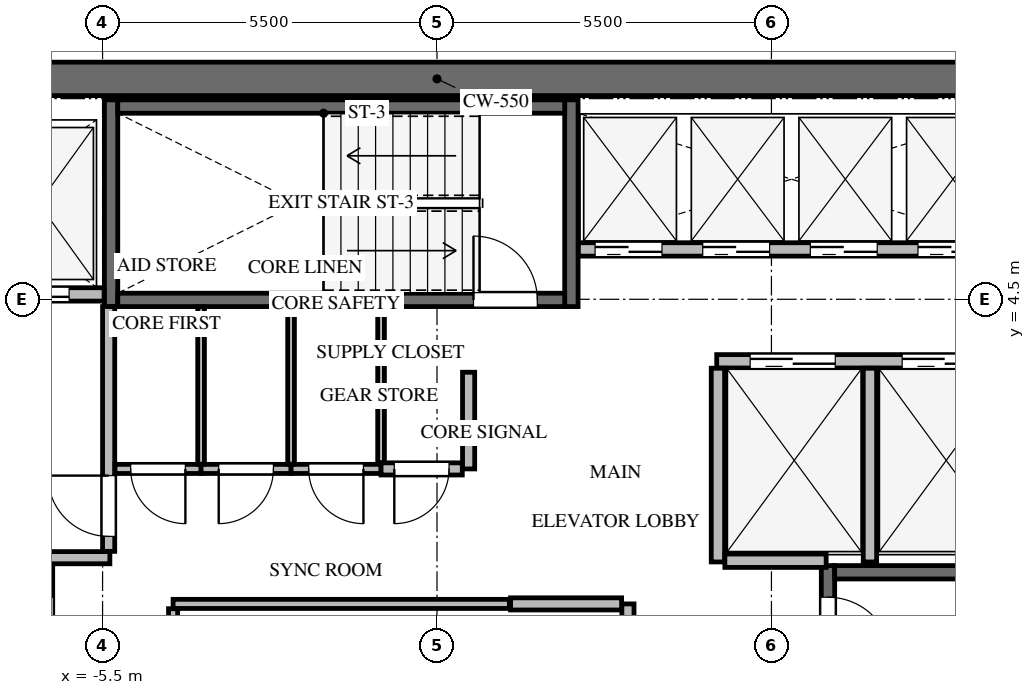
"""IFC4 building model, lengths in metres.
Left out: names, types, materials, properties, quantities, classifications, styles, units other than length and angle.
Written with IfcOpenShell. Run it as: python <this file> out.ifc"""

import sys

from ifc_helpers import new_model, si_unit, direction, frame, frame_2d, origin, place, context, subcontext, project, spatial, rectangle, extrude, source, transform, mapped, element, fill, save


model = new_model("IFC4")
c1 = context("Model", 3, precision=1e-05, world=origin(), true_north=direction((0.0, 1.0)))
c2 = subcontext(c1, "Body", "Model", "MODEL_VIEW")
j1 = project(units=[si_unit("LENGTHUNIT", "METRE"), si_unit("PLANEANGLEUNIT", "RADIAN")], contexts=[c1])
p1 = place(None, origin())
s1 = spatial("IfcSite", under=j1, at=p1, CompositionType="ELEMENT")
p2 = place(p1, origin())
s2 = spatial("IfcBuilding", under=s1, at=p2, CompositionType="ELEMENT")
p3 = place(p2, frame((0.0, 0.0, 248.0)))
s3 = spatial("IfcBuildingStorey", under=s2, at=p3, CompositionType="ELEMENT", Elevation=248.0)
p4 = place(p3, frame((-9.85, 8.125, 0.0), z_axis=(0.0, 0.0, 1.0), x_axis=(1.0, 0.0, 0.0)))
e1 = element("IfcWall", 1, at=p4, inside=s3, PredefinedType="SHEAR", context=c2, shape_type="SweptSolid", body=[
    extrude(rectangle(XDim=19.7, YDim=0.55, at=frame_2d((9.85, 0.0))), origin(), (0.0, 0.0, 1.0), 3.3),
])
p5 = place(p3, frame((-6.43, -7.77, -0.24), z_axis=(0.0, 0.0, 1.0), x_axis=(0.0, 1.0, 0.0)))
e2 = element("IfcWall", 2, at=p5, inside=s3, PredefinedType="SHEAR", context=c2, shape_type="SweptSolid", body=[
    extrude(rectangle(XDim=7.89, YDim=0.22, at=frame_2d((3.945, 0.0))), origin(), (0.0, 0.0, 1.0), 3.3),
])
p6 = place(p5, frame((6.32, 0.0, 0.0)))
e3 = element("IfcOpeningElement", 3, at=p6, cuts=e2, PredefinedType="OPENING", context=c2, shape_type="SweptSolid", body=[
    extrude(rectangle(XDim=1.05, YDim=2.15, at=frame_2d((0.525, 1.075))), frame((0.0, 0.12, 0.0), z_axis=(0.0, -1.0, 0.0), x_axis=(1.0, 0.0, 0.0)), (0.0, 0.0, 1.0), 0.24),
])
p7 = place(p3, frame((6.43, 0.12, -0.24), z_axis=(0.0, 0.0, 1.0), x_axis=(0.0, -1.0, 0.0)))
e4 = element("IfcWall", 4, at=p7, inside=s3, PredefinedType="SHEAR", context=c2, shape_type="SweptSolid", body=[
    extrude(rectangle(XDim=7.89, YDim=0.22, at=frame_2d((3.945, 0.0))), origin(), (0.0, 0.0, 1.0), 3.3),
])
p8 = place(p7, frame((0.52, 0.0, 0.0)))
e5 = element("IfcOpeningElement", 5, at=p8, cuts=e4, PredefinedType="OPENING", context=c2, shape_type="SweptSolid", body=[
    extrude(rectangle(XDim=1.05, YDim=2.15, at=frame_2d((0.525, 1.075))), frame((0.0, 0.12, 0.0), z_axis=(0.0, -1.0, 0.0), x_axis=(1.0, 0.0, 0.0)), (0.0, 0.0, 1.0), 0.24),
])
p9 = place(p3, frame((9.5, 0.01, -0.24), z_axis=(0.0, 0.0, 1.0), x_axis=(-1.0, 0.0, 0.0)))
e6 = element("IfcWall", 6, at=p9, inside=s3, PredefinedType="SHEAR", context=c2, shape_type="SweptSolid", body=[
    extrude(rectangle(XDim=2.96, YDim=0.22, at=frame_2d((1.48, 0.0))), origin(), (0.0, 0.0, 1.0), 3.3),
])
for number, where, z_axis, x_axis in (
    (7, (2.21, 4.38, -0.24), (0.0, 0.0, 1.0), (0.0, 1.0, 0.0)),
    (8, (-5.36, 7.78, -0.24), (0.0, 0.0, 1.0), (0.0, -1.0, 0.0)),
):
    element("IfcWall", number, at=place(p3, frame(where, z_axis=z_axis, x_axis=x_axis)), inside=s3, PredefinedType="SHEAR", context=c2, shape_type="SweptSolid", body=[
        extrude(rectangle(XDim=3.4, YDim=0.22, at=frame_2d((1.7, 0.0))), origin(), (0.0, 0.0, 1.0), 3.3),
    ])
p10 = place(p3, frame((-5.25, 4.49, -0.24), z_axis=(0.0, 0.0, 1.0), x_axis=(1.0, 0.0, 0.0)))
e9 = element("IfcWall", 9, at=p10, inside=s3, PredefinedType="SHEAR", context=c2, shape_type="SweptSolid", body=[
    extrude(rectangle(XDim=7.35, YDim=0.22, at=frame_2d((3.675, 0.0))), origin(), (0.0, 0.0, 1.0), 3.3),
])
p11 = place(p10, frame((5.85, 0.0, 0.0)))
e10 = element("IfcOpeningElement", 10, at=p11, cuts=e9, PredefinedType="OPENING", context=c2, shape_type="SweptSolid", body=[
    extrude(rectangle(XDim=1.05, YDim=2.15, at=frame_2d((0.525, 1.075))), frame((0.0, 0.12, 0.0), z_axis=(0.0, -1.0, 0.0), x_axis=(1.0, 0.0, 0.0)), (0.0, 0.0, 1.0), 0.24),
])
p12 = place(p3, frame((2.1, 7.67, -0.24), z_axis=(0.0, 0.0, 1.0), x_axis=(-1.0, 0.0, 0.0)))
e11 = element("IfcWall", 11, at=p12, inside=s3, PredefinedType="SHEAR", context=c2, shape_type="SweptSolid", body=[
    extrude(rectangle(XDim=7.35, YDim=0.22, at=frame_2d((3.675, 0.0))), origin(), (0.0, 0.0, 1.0), 3.3),
])
p13 = place(p3, frame((-9.65, 4.58, 0.0), z_axis=(0.0, 0.0, 1.0), x_axis=(1.0, 0.0, 0.0)))
e12 = element("IfcWall", 12, at=p13, inside=s3, PredefinedType="SOLIDWALL", context=c2, shape_type="SweptSolid", body=[
    extrude(rectangle(XDim=4.175, YDim=0.22, at=frame_2d((2.087, 0.0))), origin(), (0.0, 0.0, 1.0), 3.045),
])
p14 = place(p13, frame((0.4, 0.0, 0.0)))
e13 = element("IfcOpeningElement", 13, at=p14, cuts=e12, PredefinedType="OPENING", context=c2, shape_type="SweptSolid", body=[
    extrude(rectangle(XDim=1.2, YDim=2.15, at=frame_2d((0.6, 1.075))), frame((0.0, 0.12, 0.0), z_axis=(0.0, -1.0, 0.0), x_axis=(1.0, 0.0, 0.0)), (0.0, 0.0, 1.0), 0.24),
])
p15 = place(p13, frame((2.4, 0.0, 0.0)))
e14 = element("IfcOpeningElement", 14, at=p15, cuts=e12, PredefinedType="OPENING", context=c2, shape_type="SweptSolid", body=[
    extrude(rectangle(XDim=1.2, YDim=2.15, at=frame_2d((0.6, 1.075))), frame((0.0, 0.12, 0.0), z_axis=(0.0, -1.0, 0.0), x_axis=(1.0, 0.0, 0.0)), (0.0, 0.0, 1.0), 0.24),
])
p16 = place(p3, frame((-9.65, 0.25, 0.0), z_axis=(0.0, 0.0, 1.0), x_axis=(1.0, 0.0, 0.0)))
e15 = element("IfcWall", 15, at=p16, inside=s3, PredefinedType="SOLIDWALL", context=c2, shape_type="SweptSolid", body=[
    extrude(rectangle(XDim=4.27, YDim=0.2, at=frame_2d((2.135, 0.0))), origin(), (0.0, 0.0, 1.0), 3.045),
])
p17 = place(p3, frame((-5.4, 0.354, 0.0), z_axis=(0.0, 0.0, 1.0), x_axis=(0.0, 1.0, 0.0)))
e16 = element("IfcWall", 16, at=p17, inside=s3, PredefinedType="SOLIDWALL", context=c2, shape_type="SweptSolid", body=[
    extrude(rectangle(XDim=4.026, YDim=0.2, at=frame_2d((2.013, 0.0))), origin(), (0.0, 0.0, 1.0), 3.045),
])
p18 = place(p17, frame((0.246, 0.0, 0.0)))
e17 = element("IfcOpeningElement", 17, at=p18, cuts=e16, PredefinedType="OPENING", context=c2, shape_type="SweptSolid", body=[
    extrude(rectangle(XDim=1.0, YDim=2.15, at=frame_2d((0.5, 1.075))), frame((0.0, 0.11, 0.0), z_axis=(0.0, -1.0, 0.0), x_axis=(1.0, 0.0, 0.0)), (0.0, 0.0, 1.0), 0.22),
])
p19 = place(p3, frame((4.6, 3.48, 0.0), z_axis=(0.0, 0.0, 1.0), x_axis=(1.0, 0.0, 0.0)))
e18 = element("IfcWall", 18, at=p19, inside=s3, PredefinedType="SOLIDWALL", context=c2, shape_type="SweptSolid", body=[
    extrude(rectangle(XDim=5.05, YDim=0.22, at=frame_2d((2.525, 0.0))), origin(), (0.0, 0.0, 1.0), 3.045),
])
p20 = place(p19, frame((0.55, 0.0, 0.0)))
e19 = element("IfcOpeningElement", 19, at=p20, cuts=e18, PredefinedType="OPENING", context=c2, shape_type="SweptSolid", body=[
    extrude(rectangle(XDim=1.4, YDim=2.15, at=frame_2d((0.7, 1.075))), frame((0.0, 0.12, 0.0), z_axis=(0.0, -1.0, 0.0), x_axis=(1.0, 0.0, 0.0)), (0.0, 0.0, 1.0), 0.24),
])
p21 = place(p19, frame((3.05, 0.0, 0.0)))
e20 = element("IfcOpeningElement", 20, at=p21, cuts=e18, PredefinedType="OPENING", context=c2, shape_type="SweptSolid", body=[
    extrude(rectangle(XDim=1.4, YDim=2.15, at=frame_2d((0.7, 1.075))), frame((0.0, 0.12, 0.0), z_axis=(0.0, -1.0, 0.0), x_axis=(1.0, 0.0, 0.0)), (0.0, 0.0, 1.0), 0.24),
])
for number, where, z_axis, x_axis in (
    (21, (4.62, 0.18, 0.0), (0.0, 0.0, 1.0), (0.0, 1.0, 0.0)),
    (22, (7.12, 0.18, 0.0), (0.0, 0.0, 1.0), (0.0, 1.0, 0.0)),
):
    element("IfcWall", number, at=place(p3, frame(where, z_axis=z_axis, x_axis=x_axis)), inside=s3, PredefinedType="SOLIDWALL", context=c2, shape_type="SweptSolid", body=[
        extrude(rectangle(XDim=3.186, YDim=0.22, at=frame_2d((1.593, 0.0))), origin(), (0.0, 0.0, 1.0), 3.045),
    ])
p22 = place(p3, frame((4.734, 0.2, 0.0), z_axis=(0.0, 0.0, 1.0), x_axis=(1.0, 0.0, 0.0)))
e23 = element("IfcWall", 23, at=p22, inside=s3, PredefinedType="SOLIDWALL", context=c2, shape_type="SweptSolid", body=[
    extrude(rectangle(XDim=1.666, YDim=0.22, at=frame_2d((0.833, 0.0))), origin(), (0.0, 0.0, 1.0), 3.045),
])
p23 = place(p3, frame((2.325, 5.32, 0.0), z_axis=(0.0, 0.0, 1.0), x_axis=(1.0, 0.0, 0.0)))
e24 = element("IfcWall", 24, at=p23, inside=s3, PredefinedType="SOLIDWALL", context=c2, shape_type="SweptSolid", body=[
    extrude(rectangle(XDim=7.325, YDim=0.22, at=frame_2d((3.663, 0.0))), origin(), (0.0, 0.0, 1.0), 3.045),
])
p24 = place(p23, frame((0.275, 0.0, 0.0)))
e25 = element("IfcOpeningElement", 25, at=p24, cuts=e24, PredefinedType="OPENING", context=c2, shape_type="SweptSolid", body=[
    extrude(rectangle(XDim=1.1, YDim=2.15, at=frame_2d((0.55, 1.075))), frame((0.0, 0.12, 0.0), z_axis=(0.0, -1.0, 0.0), x_axis=(1.0, 0.0, 0.0)), (0.0, 0.0, 1.0), 0.24),
])
p25 = place(p23, frame((2.045, 0.0, 0.0)))
e26 = element("IfcOpeningElement", 26, at=p25, cuts=e24, PredefinedType="OPENING", context=c2, shape_type="SweptSolid", body=[
    extrude(rectangle(XDim=1.1, YDim=2.15, at=frame_2d((0.55, 1.075))), frame((0.0, 0.12, 0.0), z_axis=(0.0, -1.0, 0.0), x_axis=(1.0, 0.0, 0.0)), (0.0, 0.0, 1.0), 0.24),
])
p26 = place(p23, frame((3.815, 0.0, 0.0)))
e27 = element("IfcOpeningElement", 27, at=p26, cuts=e24, PredefinedType="OPENING", context=c2, shape_type="SweptSolid", body=[
    extrude(rectangle(XDim=1.1, YDim=2.15, at=frame_2d((0.55, 1.075))), frame((0.0, 0.12, 0.0), z_axis=(0.0, -1.0, 0.0), x_axis=(1.0, 0.0, 0.0)), (0.0, 0.0, 1.0), 0.24),
])
p27 = place(p23, frame((5.585, 0.0, 0.0)))
e28 = element("IfcOpeningElement", 28, at=p27, cuts=e24, PredefinedType="OPENING", context=c2, shape_type="SweptSolid", body=[
    extrude(rectangle(XDim=1.1, YDim=2.15, at=frame_2d((0.55, 1.075))), frame((0.0, 0.12, 0.0), z_axis=(0.0, -1.0, 0.0), x_axis=(1.0, 0.0, 0.0)), (0.0, 0.0, 1.0), 0.24),
])
p28 = place(p3, frame((-4.34, -0.51, 0.0), z_axis=(0.0, 0.0, 1.0), x_axis=(1.0, 0.0, 0.0)))
e29 = element("IfcWall", 29, at=p28, inside=s3, PredefinedType="PARTITIONING", context=c2, shape_type="SweptSolid", body=[
    extrude(rectangle(XDim=5.53, YDim=0.15, at=frame_2d((2.765, 0.0))), origin(), (0.0, 0.0, 1.0), 3.045),
])
p29 = place(p3, frame((-4.34, -2.961, 0.0), z_axis=(0.0, 0.0, 1.0), x_axis=(0.0, 1.0, 0.0)))
e30 = element("IfcWall", 30, at=p29, inside=s3, PredefinedType="PARTITIONING", context=c2, shape_type="SweptSolid", body=[
    extrude(rectangle(XDim=2.372, YDim=0.15, at=frame_2d((1.186, 0.0))), origin(), (0.0, 0.0, 1.0), 3.045),
])
p30 = place(p3, frame((3.14, -0.51, 0.0), z_axis=(0.0, 0.0, 1.0), x_axis=(0.0, -1.0, 0.0)))
e31 = element("IfcWall", 31, at=p30, inside=s3, PredefinedType="SOLIDWALL", context=c2, shape_type="SweptSolid", body=[
    extrude(rectangle(XDim=2.53, YDim=0.2, at=frame_2d((1.265, 0.0))), origin(), (0.0, 0.0, 1.0), 3.045),
])
p31 = place(p30, frame((0.815, 0.0, 0.0)))
e32 = element("IfcOpeningElement", 32, at=p31, cuts=e31, PredefinedType="OPENING", context=c2, shape_type="SweptSolid", body=[
    extrude(rectangle(XDim=0.9, YDim=2.05, at=frame_2d((0.45, 1.025))), frame((0.0, 0.11, 0.0), z_axis=(0.0, -1.0, 0.0), x_axis=(1.0, 0.0, 0.0)), (0.0, 0.0, 1.0), 0.22),
])
p32 = place(p3, frame((1.21, -0.51, 0.0), z_axis=(0.0, 0.0, 1.0), x_axis=(1.0, 0.0, 0.0)))
e33 = element("IfcWall", 33, at=p32, inside=s3, PredefinedType="SOLIDWALL", context=c2, shape_type="SweptSolid", body=[
    extrude(rectangle(XDim=1.826, YDim=0.2, at=frame_2d((0.913, 0.0))), origin(), (0.0, 0.0, 1.0), 3.045),
])
p33 = place(p3, frame((-3.88, 1.71, 0.0), z_axis=(0.0, 0.0, 1.0), x_axis=(-1.0, 0.0, 0.0)))
e34 = element("IfcWall", 34, at=p33, inside=s3, PredefinedType="PARTITIONING", context=c2, shape_type="SweptSolid", body=[
    extrude(rectangle(XDim=1.416, YDim=0.15, at=frame_2d((0.708, 0.0))), origin(), (0.0, 0.0, 1.0), 3.045),
])
p34 = place(p33, frame((0.258, 0.0, 0.0)))
e35 = element("IfcOpeningElement", 35, at=p34, cuts=e34, PredefinedType="OPENING", context=c2, shape_type="SweptSolid", body=[
    extrude(rectangle(XDim=0.9, YDim=2.05, at=frame_2d((0.45, 1.025))), frame((0.0, 0.085, 0.0), z_axis=(0.0, -1.0, 0.0), x_axis=(1.0, 0.0, 0.0)), (0.0, 0.0, 1.0), 0.17),
])
p35 = place(p3, frame((-2.4, 1.71, 0.0), z_axis=(0.0, 0.0, 1.0), x_axis=(-1.0, 0.0, 0.0)))
e36 = element("IfcWall", 36, at=p35, inside=s3, PredefinedType="PARTITIONING", context=c2, shape_type="SweptSolid", body=[
    extrude(rectangle(XDim=1.48, YDim=0.15, at=frame_2d((0.74, 0.0))), origin(), (0.0, 0.0, 1.0), 3.045),
])
p36 = place(p35, frame((0.29, 0.0, 0.0)))
e37 = element("IfcOpeningElement", 37, at=p36, cuts=e36, PredefinedType="OPENING", context=c2, shape_type="SweptSolid", body=[
    extrude(rectangle(XDim=0.9, YDim=2.05, at=frame_2d((0.45, 1.025))), frame((0.0, 0.085, 0.0), z_axis=(0.0, -1.0, 0.0), x_axis=(1.0, 0.0, 0.0)), (0.0, 0.0, 1.0), 0.17),
])
p37 = place(p3, frame((-0.92, 1.71, 0.0), z_axis=(0.0, 0.0, 1.0), x_axis=(-1.0, 0.0, 0.0)))
e38 = element("IfcWall", 38, at=p37, inside=s3, PredefinedType="PARTITIONING", context=c2, shape_type="SweptSolid", body=[
    extrude(rectangle(XDim=1.48, YDim=0.15, at=frame_2d((0.74, 0.0))), origin(), (0.0, 0.0, 1.0), 3.045),
])
p38 = place(p37, frame((0.29, 0.0, 0.0)))
e39 = element("IfcOpeningElement", 39, at=p38, cuts=e38, PredefinedType="OPENING", context=c2, shape_type="SweptSolid", body=[
    extrude(rectangle(XDim=0.9, YDim=2.05, at=frame_2d((0.45, 1.025))), frame((0.0, 0.085, 0.0), z_axis=(0.0, -1.0, 0.0), x_axis=(1.0, 0.0, 0.0)), (0.0, 0.0, 1.0), 0.17),
])
p39 = place(p3, frame((0.52, 3.3, 0.0), z_axis=(0.0, 0.0, 1.0), x_axis=(0.0, -1.0, 0.0)))
e40 = element("IfcWall", 40, at=p39, inside=s3, PredefinedType="SOLIDWALL", context=c2, shape_type="SweptSolid", body=[
    extrude(rectangle(XDim=1.59, YDim=0.2, at=frame_2d((0.795, 0.0))), origin(), (0.0, 0.0, 1.0), 3.045),
])
p40 = place(p3, frame((0.416, 1.71, 0.0), z_axis=(0.0, 0.0, 1.0), x_axis=(-1.0, 0.0, 0.0)))
e41 = element("IfcWall", 41, at=p40, inside=s3, PredefinedType="SOLIDWALL", context=c2, shape_type="SweptSolid", body=[
    extrude(rectangle(XDim=1.336, YDim=0.2, at=frame_2d((0.668, 0.0))), origin(), (0.0, 0.0, 1.0), 3.045),
])
p41 = place(p40, frame((0.218, 0.0, 0.0)))
e42 = element("IfcOpeningElement", 42, at=p41, cuts=e41, PredefinedType="OPENING", context=c2, shape_type="SweptSolid", body=[
    extrude(rectangle(XDim=0.9, YDim=2.05, at=frame_2d((0.45, 1.025))), frame((0.0, 0.11, 0.0), z_axis=(0.0, -1.0, 0.0), x_axis=(1.0, 0.0, 0.0)), (0.0, 0.0, 1.0), 0.22),
])
for number, where, z_axis, x_axis in (
    (43, (-3.88, 4.375, 0.0), (0.0, 0.0, 1.0), (0.0, -1.0, 0.0)),
    (44, (-2.4, 4.375, 0.0), (0.0, 0.0, 1.0), (0.0, -1.0, 0.0)),
):
    element("IfcWall", number, at=place(p3, frame(where, z_axis=z_axis, x_axis=x_axis)), inside=s3, PredefinedType="MOVABLE", context=c2, shape_type="SweptSolid", body=[
        extrude(rectangle(XDim=2.586, YDim=0.11, at=frame_2d((1.293, 0.0))), origin(), (0.0, 0.0, 1.0), 3.045),
    ])
p42 = place(p3, frame((-0.92, 4.375, 0.0), z_axis=(0.0, 0.0, 1.0), x_axis=(0.0, -1.0, 0.0)))
e45 = element("IfcWall", 45, at=p42, inside=s3, PredefinedType="MOVABLE", context=c2, shape_type="SweptSolid", body=[
    extrude(rectangle(XDim=2.561, YDim=0.11, at=frame_2d((1.281, 0.0))), origin(), (0.0, 0.0, 1.0), 3.045),
])
m1 = source(origin(), c2, "Body", "SweptSolid", [
    extrude(rectangle(XDim=1.05, YDim=2.15, at=frame_2d((0.525, 1.075))), frame((0.0, 0.025, 0.0), z_axis=(0.0, -1.0, 0.0), x_axis=(1.0, 0.0, 0.0)), (0.0, 0.0, 1.0), 0.05),
])
p43 = place(p8, origin())
e46 = element("IfcDoor", 46, at=p43, inside=s3, OperationType="SINGLE_SWING_RIGHT", PredefinedType="DOOR", context=c2, shape_type="MappedRepresentation", body=[
    mapped(m1, transform((0.0, 0.0, 0.0), x_axis=(1.0, 0.0, 0.0), y_axis=(0.0, 1.0, 0.0), z_axis=(0.0, 0.0, 1.0), scale=1.0)),
])
fill(e5, e46)
m2 = source(origin(), c2, "Body", "SweptSolid", [
    extrude(rectangle(XDim=1.05, YDim=2.15, at=frame_2d((0.525, 1.075))), frame((0.0, 0.025, 0.0), z_axis=(0.0, -1.0, 0.0), x_axis=(1.0, 0.0, 0.0)), (0.0, 0.0, 1.0), 0.05),
])
p44 = place(p11, origin())
e47 = element("IfcDoor", 47, at=p44, inside=s3, OperationType="SINGLE_SWING_LEFT", PredefinedType="DOOR", context=c2, shape_type="MappedRepresentation", body=[
    mapped(m2, transform((0.0, 0.0, 0.0), x_axis=(1.0, 0.0, 0.0), y_axis=(0.0, 1.0, 0.0), z_axis=(0.0, 0.0, 1.0), scale=1.0)),
])
fill(e10, e47)
m3 = source(origin(), c2, "Body", "SweptSolid", [
    extrude(rectangle(XDim=1.2, YDim=2.15, at=frame_2d((0.6, 1.075))), frame((0.0, 0.025, 0.0), z_axis=(0.0, -1.0, 0.0), x_axis=(1.0, 0.0, 0.0)), (0.0, 0.0, 1.0), 0.05),
])
p45 = place(p15, origin())
e48 = element("IfcDoor", 48, at=p45, inside=s3, OperationType="DOUBLE_DOOR_SLIDING", PredefinedType="DOOR", context=c2, shape_type="MappedRepresentation", body=[
    mapped(m3, transform((0.0, 0.0, 0.0), x_axis=(1.0, 0.0, 0.0), y_axis=(0.0, 1.0, 0.0), z_axis=(0.0, 0.0, 1.0), scale=1.0)),
])
fill(e14, e48)
m4 = source(origin(), c2, "Body", "SweptSolid", [
    extrude(rectangle(XDim=1.0, YDim=2.15, at=frame_2d((0.5, 1.075))), frame((0.0, 0.025, 0.0), z_axis=(0.0, -1.0, 0.0), x_axis=(1.0, 0.0, 0.0)), (0.0, 0.0, 1.0), 0.05),
])
p46 = place(p18, origin())
e49 = element("IfcDoor", 49, at=p46, inside=s3, OperationType="SINGLE_SWING_RIGHT", PredefinedType="DOOR", context=c2, shape_type="MappedRepresentation", body=[
    mapped(m4, transform((0.0, 0.0, 0.0), x_axis=(1.0, 0.0, 0.0), y_axis=(0.0, 1.0, 0.0), z_axis=(0.0, 0.0, 1.0), scale=1.0)),
])
fill(e17, e49)
m5 = source(origin(), c2, "Body", "SweptSolid", [
    extrude(rectangle(XDim=1.4, YDim=2.15, at=frame_2d((0.7, 1.075))), frame((0.0, 0.025, 0.0), z_axis=(0.0, -1.0, 0.0), x_axis=(1.0, 0.0, 0.0)), (0.0, 0.0, 1.0), 0.05),
])
p47 = place(p20, origin())
e50 = element("IfcDoor", 50, at=p47, inside=s3, OperationType="DOUBLE_DOOR_SLIDING", PredefinedType="DOOR", context=c2, shape_type="MappedRepresentation", body=[
    mapped(m5, transform((0.0, 0.0, 0.0), x_axis=(1.0, 0.0, 0.0), y_axis=(0.0, 1.0, 0.0), z_axis=(0.0, 0.0, 1.0), scale=1.0)),
])
fill(e19, e50)
p48 = place(p21, origin())
e51 = element("IfcDoor", 51, at=p48, inside=s3, OperationType="DOUBLE_DOOR_SLIDING", PredefinedType="DOOR", context=c2, shape_type="MappedRepresentation", body=[
    mapped(m5, transform((0.0, 0.0, 0.0), x_axis=(1.0, 0.0, 0.0), y_axis=(0.0, 1.0, 0.0), z_axis=(0.0, 0.0, 1.0), scale=1.0)),
])
fill(e20, e51)
m6 = source(origin(), c2, "Body", "SweptSolid", [
    extrude(rectangle(XDim=1.1, YDim=2.15, at=frame_2d((0.55, 1.075))), frame((0.0, 0.025, 0.0), z_axis=(0.0, -1.0, 0.0), x_axis=(1.0, 0.0, 0.0)), (0.0, 0.0, 1.0), 0.05),
])
p49 = place(p24, origin())
e52 = element("IfcDoor", 52, at=p49, inside=s3, OperationType="DOUBLE_DOOR_SLIDING", PredefinedType="DOOR", context=c2, shape_type="MappedRepresentation", body=[
    mapped(m6, transform((0.0, 0.0, 0.0), x_axis=(1.0, 0.0, 0.0), y_axis=(0.0, 1.0, 0.0), z_axis=(0.0, 0.0, 1.0), scale=1.0)),
])
fill(e25, e52)
p50 = place(p25, origin())
e53 = element("IfcDoor", 53, at=p50, inside=s3, OperationType="DOUBLE_DOOR_SLIDING", PredefinedType="DOOR", context=c2, shape_type="MappedRepresentation", body=[
    mapped(m6, transform((0.0, 0.0, 0.0), x_axis=(1.0, 0.0, 0.0), y_axis=(0.0, 1.0, 0.0), z_axis=(0.0, 0.0, 1.0), scale=1.0)),
])
fill(e26, e53)
p51 = place(p26, origin())
e54 = element("IfcDoor", 54, at=p51, inside=s3, OperationType="DOUBLE_DOOR_SLIDING", PredefinedType="DOOR", context=c2, shape_type="MappedRepresentation", body=[
    mapped(m6, transform((0.0, 0.0, 0.0), x_axis=(1.0, 0.0, 0.0), y_axis=(0.0, 1.0, 0.0), z_axis=(0.0, 0.0, 1.0), scale=1.0)),
])
fill(e27, e54)
p52 = place(p27, origin())
e55 = element("IfcDoor", 55, at=p52, inside=s3, OperationType="DOUBLE_DOOR_SLIDING", PredefinedType="DOOR", context=c2, shape_type="MappedRepresentation", body=[
    mapped(m6, transform((0.0, 0.0, 0.0), x_axis=(1.0, 0.0, 0.0), y_axis=(0.0, 1.0, 0.0), z_axis=(0.0, 0.0, 1.0), scale=1.0)),
])
fill(e28, e55)
m7 = source(origin(), c2, "Body", "SweptSolid", [
    extrude(rectangle(XDim=0.9, YDim=2.05, at=frame_2d((0.45, 1.025))), frame((0.0, 0.025, 0.0), z_axis=(0.0, -1.0, 0.0), x_axis=(1.0, 0.0, 0.0)), (0.0, 0.0, 1.0), 0.05),
])
p53 = place(p34, origin())
e56 = element("IfcDoor", 56, at=p53, inside=s3, OperationType="SINGLE_SWING_LEFT", PredefinedType="DOOR", context=c2, shape_type="MappedRepresentation", body=[
    mapped(m7, transform((0.0, 0.0, 0.0), x_axis=(1.0, 0.0, 0.0), y_axis=(0.0, 1.0, 0.0), z_axis=(0.0, 0.0, 1.0), scale=1.0)),
])
fill(e35, e56)
m8 = source(origin(), c2, "Body", "SweptSolid", [
    extrude(rectangle(XDim=0.9, YDim=2.05, at=frame_2d((0.45, 1.025))), frame((0.0, 0.025, 0.0), z_axis=(0.0, -1.0, 0.0), x_axis=(1.0, 0.0, 0.0)), (0.0, 0.0, 1.0), 0.05),
])
p54 = place(p36, origin())
e57 = element("IfcDoor", 57, at=p54, inside=s3, OperationType="SINGLE_SWING_RIGHT", PredefinedType="DOOR", context=c2, shape_type="MappedRepresentation", body=[
    mapped(m8, transform((0.0, 0.0, 0.0), x_axis=(1.0, 0.0, 0.0), y_axis=(0.0, 1.0, 0.0), z_axis=(0.0, 0.0, 1.0), scale=1.0)),
])
fill(e37, e57)
p55 = place(p38, origin())
e58 = element("IfcDoor", 58, at=p55, inside=s3, OperationType="SINGLE_SWING_LEFT", PredefinedType="DOOR", context=c2, shape_type="MappedRepresentation", body=[
    mapped(m7, transform((0.0, 0.0, 0.0), x_axis=(1.0, 0.0, 0.0), y_axis=(0.0, 1.0, 0.0), z_axis=(0.0, 0.0, 1.0), scale=1.0)),
])
fill(e39, e58)
p56 = place(p41, origin())
e59 = element("IfcDoor", 59, at=p56, inside=s3, OperationType="SINGLE_SWING_RIGHT", PredefinedType="DOOR", context=c2, shape_type="MappedRepresentation", body=[
    mapped(m8, transform((0.0, 0.0, 0.0), x_axis=(1.0, 0.0, 0.0), y_axis=(0.0, 1.0, 0.0), z_axis=(0.0, 0.0, 1.0), scale=1.0)),
])
fill(e42, e59)
save(model, sys.argv[1])
